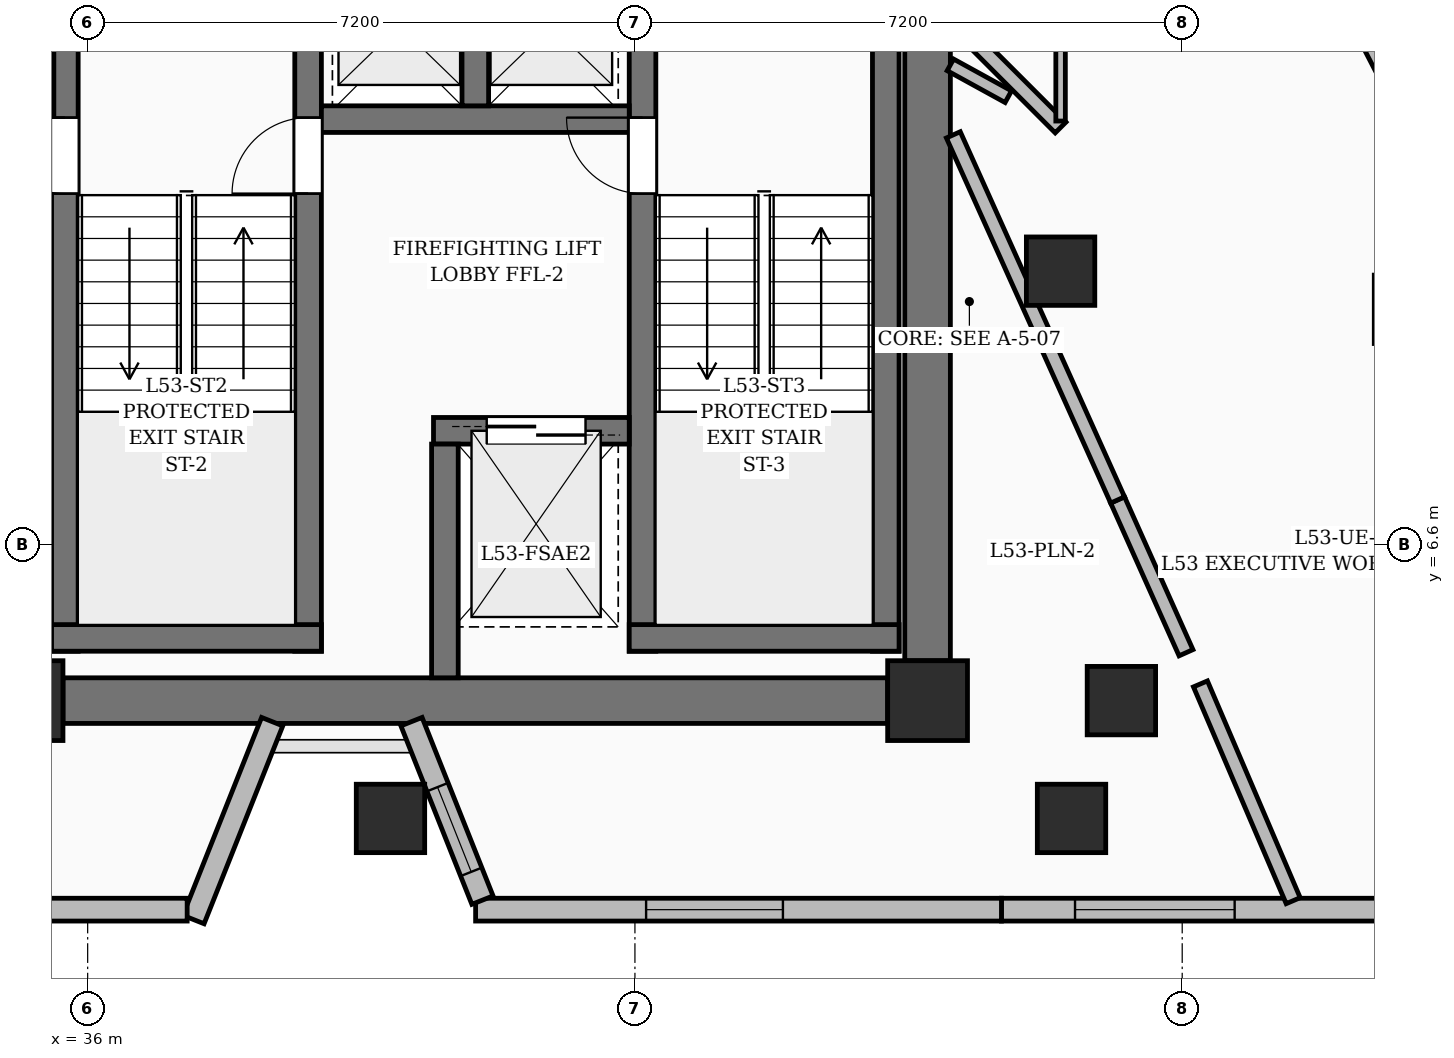
"""IFC4 building model, lengths in metres.
Left out: names, types, materials, properties, quantities, classifications, styles, units other than length and angle.
Written with IfcOpenShell. Run it as: python <this file> out.ifc"""

import sys

from ifc_helpers import new_model, si_unit, direction, frame, frame_2d, origin, origin_2d, place, context, subcontext, project, spatial, rectangle, extrude, element, fill, save


model = new_model("IFC4")
c1 = context("Model", 3, precision=1e-05, world=origin(), true_north=direction((0.0, 1.0)))
c2 = subcontext(c1, "Body", "Model", "MODEL_VIEW")
j1 = project(units=[si_unit("LENGTHUNIT", "METRE"), si_unit("PLANEANGLEUNIT", "RADIAN")], contexts=[c1])
p1 = place(None, origin())
s1 = spatial("IfcSite", under=j1, at=p1, CompositionType="ELEMENT")
p2 = place(p1, origin())
s2 = spatial("IfcBuilding", under=s1, at=p2, CompositionType="ELEMENT")
p3 = place(p2, frame((0.0, 0.0, 207.0)))
s3 = spatial("IfcBuildingStorey", under=s2, at=p3, CompositionType="ELEMENT", Elevation=207.0)
for number, where, z_axis, x_axis in (
    (1, (35.15, 4.55, 0.0), (0.0, 0.0, 1.0), (1.0, 0.0, 0.0)),
    (2, (47.05, 4.55, 0.0), (0.0, 0.0, 1.0), (1.0, 0.0, 0.0)),
):
    element("IfcColumn", number, at=place(p3, frame(where, z_axis=z_axis, x_axis=x_axis)), inside=s3, PredefinedType="COLUMN", context=c2, shape_type="SweptSolid", body=[
        extrude(rectangle(XDim=1.05, YDim=1.05, at=origin_2d()), origin(), (0.0, 0.0, 1.0), 3.75),
    ])
for number, where, z_axis, x_axis in (
    (3, (49.6, 4.55, 0.0), (0.0, 0.0, 1.0), (1.0, 0.0, 0.0)),
    (4, (48.8, 10.2, 0.0), (0.0, 0.0, 1.0), (1.0, 0.0, 0.0)),
):
    element("IfcColumn", number, at=place(p3, frame(where, z_axis=z_axis, x_axis=x_axis)), inside=s3, PredefinedType="COLUMN", context=c2, shape_type="SweptSolid", body=[
        extrude(rectangle(XDim=0.9, YDim=0.9, at=origin_2d()), origin(), (0.0, 0.0, 1.0), 3.75),
    ])
p4 = place(p3, frame((35.675, 4.55, 0.0), z_axis=(0.0, 0.0, 1.0), x_axis=(1.0, 0.0, 0.0)))
e5 = element("IfcWall", 5, at=p4, inside=s3, PredefinedType="SHEAR", context=c2, shape_type="SweptSolid", body=[
    extrude(rectangle(XDim=10.85, YDim=0.6, at=frame_2d((5.425, 0.0))), origin(), (0.0, 0.0, 1.0), 3.75),
])
p5 = place(p3, frame((47.05, 5.075, 0.0), z_axis=(0.0, 0.0, 1.0), x_axis=(0.0, 1.0, 0.0)))
e6 = element("IfcWall", 6, at=p5, inside=s3, PredefinedType="SHEAR", context=c2, shape_type="SweptSolid", body=[
    extrude(rectangle(XDim=9.15, YDim=0.6, at=frame_2d((4.575, 0.0))), origin(), (0.0, 0.0, 1.0), 3.75),
])
p6 = place(p3, frame((35.7, 5.2, 0.0), z_axis=(0.0, 0.0, 1.0), x_axis=(0.0, 1.0, 0.0)))
e7 = element("IfcWall", 7, at=p6, inside=s3, PredefinedType="SOLIDWALL", context=c2, shape_type="SweptSolid", body=[
    extrude(rectangle(XDim=9.25, YDim=0.35, at=frame_2d((4.625, 0.0))), origin(), (0.0, 0.0, 1.0), 3.75),
])
p7 = place(p6, frame((6.02, 0.0, 0.0)))
e8 = element("IfcOpeningElement", 8, at=p7, cuts=e7, PredefinedType="OPENING", context=c2, shape_type="SweptSolid", body=[
    extrude(rectangle(XDim=1.0, YDim=2.15, at=frame_2d((0.5, 1.075))), frame((0.0, 0.185, 0.0), z_axis=(0.0, -1.0, 0.0), x_axis=(1.0, 0.0, 0.0)), (0.0, 0.0, 1.0), 0.37),
])
p8 = place(p3, frame((38.9, 5.2, 0.0), z_axis=(0.0, 0.0, 1.0), x_axis=(0.0, 1.0, 0.0)))
e9 = element("IfcWall", 9, at=p8, inside=s3, PredefinedType="SOLIDWALL", context=c2, shape_type="SweptSolid", body=[
    extrude(rectangle(XDim=9.25, YDim=0.35, at=frame_2d((4.625, 0.0))), origin(), (0.0, 0.0, 1.0), 3.75),
])
p9 = place(p8, frame((6.02, 0.0, 0.0)))
e10 = element("IfcOpeningElement", 10, at=p9, cuts=e9, PredefinedType="OPENING", context=c2, shape_type="SweptSolid", body=[
    extrude(rectangle(XDim=1.0, YDim=2.15, at=frame_2d((0.5, 1.075))), frame((0.0, 0.185, 0.0), z_axis=(0.0, -1.0, 0.0), x_axis=(1.0, 0.0, 0.0)), (0.0, 0.0, 1.0), 0.37),
])
p10 = place(p3, frame((35.525, 5.375, 0.0), z_axis=(0.0, 0.0, 1.0), x_axis=(1.0, 0.0, 0.0)))
e11 = element("IfcWall", 11, at=p10, inside=s3, PredefinedType="SOLIDWALL", context=c2, shape_type="SweptSolid", body=[
    extrude(rectangle(XDim=3.55, YDim=0.35, at=frame_2d((1.775, 0.0))), origin(), (0.0, 0.0, 1.0), 3.75),
])
p11 = place(p3, frame((43.3, 5.2, 0.0), z_axis=(0.0, 0.0, 1.0), x_axis=(0.0, 1.0, 0.0)))
e12 = element("IfcWall", 12, at=p11, inside=s3, PredefinedType="SOLIDWALL", context=c2, shape_type="SweptSolid", body=[
    extrude(rectangle(XDim=9.25, YDim=0.35, at=frame_2d((4.625, 0.0))), origin(), (0.0, 0.0, 1.0), 3.75),
])
p12 = place(p11, frame((6.02, 0.0, 0.0)))
e13 = element("IfcOpeningElement", 13, at=p12, cuts=e12, PredefinedType="OPENING", context=c2, shape_type="SweptSolid", body=[
    extrude(rectangle(XDim=1.0, YDim=2.15, at=frame_2d((0.5, 1.075))), frame((0.0, 0.185, 0.0), z_axis=(0.0, -1.0, 0.0), x_axis=(1.0, 0.0, 0.0)), (0.0, 0.0, 1.0), 0.37),
])
p13 = place(p3, frame((46.5, 5.2, 0.0), z_axis=(0.0, 0.0, 1.0), x_axis=(0.0, 1.0, 0.0)))
e14 = element("IfcWall", 14, at=p13, inside=s3, PredefinedType="SOLIDWALL", context=c2, shape_type="SweptSolid", body=[
    extrude(rectangle(XDim=9.25, YDim=0.35, at=frame_2d((4.625, 0.0))), origin(), (0.0, 0.0, 1.0), 3.75),
])
p14 = place(p3, frame((43.125, 5.375, 0.0), z_axis=(0.0, 0.0, 1.0), x_axis=(1.0, 0.0, 0.0)))
e15 = element("IfcWall", 15, at=p14, inside=s3, PredefinedType="SOLIDWALL", context=c2, shape_type="SweptSolid", body=[
    extrude(rectangle(XDim=3.55, YDim=0.35, at=frame_2d((1.775, 0.0))), origin(), (0.0, 0.0, 1.0), 3.75),
])
p15 = place(p3, frame((40.55, 8.1, 0.0), z_axis=(0.0, 0.0, 1.0), x_axis=(1.0, 0.0, 0.0)))
e16 = element("IfcWall", 16, at=p15, inside=s3, PredefinedType="SOLIDWALL", context=c2, shape_type="SweptSolid", body=[
    extrude(rectangle(XDim=2.575, YDim=0.35, at=frame_2d((1.288, 0.0))), origin(), (0.0, 0.0, 1.0), 3.75),
])
p16 = place(p15, frame((0.7, 0.0, 0.0)))
e17 = element("IfcOpeningElement", 17, at=p16, cuts=e16, PredefinedType="OPENING", context=c2, shape_type="SweptSolid", body=[
    extrude(rectangle(XDim=1.3, YDim=2.25, at=frame_2d((0.65, 1.125))), frame((0.0, 0.185, 0.0), z_axis=(0.0, -1.0, 0.0), x_axis=(1.0, 0.0, 0.0)), (0.0, 0.0, 1.0), 0.37),
])
p17 = place(p3, frame((40.7, 4.85, 0.0), z_axis=(0.0, 0.0, 1.0), x_axis=(0.0, 1.0, 0.0)))
e18 = element("IfcWall", 18, at=p17, inside=s3, PredefinedType="SOLIDWALL", context=c2, shape_type="SweptSolid", body=[
    extrude(rectangle(XDim=3.075, YDim=0.35, at=frame_2d((1.538, 0.0))), origin(), (0.0, 0.0, 1.0), 3.75),
])
p18 = place(p3, frame((39.075, 12.2, 0.0), z_axis=(0.0, 0.0, 1.0), x_axis=(1.0, 0.0, 0.0)))
e19 = element("IfcWall", 19, at=p18, inside=s3, PredefinedType="SOLIDWALL", context=c2, shape_type="SweptSolid", body=[
    extrude(rectangle(XDim=4.05, YDim=0.35, at=frame_2d((2.025, 0.0))), origin(), (0.0, 0.0, 1.0), 3.75),
])
p19 = place(p3, frame((41.1, 12.375, 0.0), z_axis=(0.0, 0.0, 1.0), x_axis=(0.0, 1.0, 0.0)))
e20 = element("IfcWall", 20, at=p19, inside=s3, PredefinedType="SOLIDWALL", context=c2, shape_type="SweptSolid", body=[
    extrude(rectangle(XDim=2.075, YDim=0.35, at=frame_2d((1.038, 0.0))), origin(), (0.0, 0.0, 1.0), 3.75),
])
for number, where, z_axis, x_axis in (
    (21, (39.984, 3.0, 0.0), (0.0, 0.0, 1.0), (1.0, 0.0, 0.0)),
    (22, (48.944, 3.0, 0.0), (0.0, 0.0, 1.0), (1.0, 0.0, 0.0)),
    (23, (53.377, 9.698, 0.0), (0.0, 0.0, 1.0), (1.0, 0.0, 0.0)),
):
    element("IfcColumn", number, at=place(p3, frame(where, z_axis=z_axis, x_axis=x_axis)), inside=s3, PredefinedType="COLUMN", context=c2, shape_type="SweptSolid", body=[
        extrude(rectangle(XDim=0.9, YDim=0.9, at=origin_2d()), origin(), (0.0, 0.0, 1.0), 3.75),
    ])
p20 = place(p3, frame((51.288, 16.369, 0.0), z_axis=(0.0, 0.0, 1.0), x_axis=(0.458306446078, -0.88879424024, 0.0)))
e24 = element("IfcWall", 24, at=p20, inside=s3, PredefinedType="SOLIDWALL", context=c2, shape_type="SweptSolid", body=[
    extrude(rectangle(XDim=6.266, YDim=0.3, at=frame_2d((3.133, 0.0))), origin(), (0.0, 0.0, 1.0), 3.5),
])
p21 = place(p20, frame((2.725, 0.0, 0.55)))
e25 = element("IfcOpeningElement", 25, at=p21, cuts=e24, PredefinedType="OPENING", context=c2, shape_type="SweptSolid", body=[
    extrude(rectangle(XDim=2.1, YDim=2.4, at=frame_2d((1.05, 1.2))), frame((0.0, 0.16, 0.0), z_axis=(0.0, -1.0, 0.0), x_axis=(1.0, 0.0, 0.0)), (0.0, 0.0, 1.0), 0.32),
])
p22 = place(p3, frame((54.36, 1.8, 0.0), z_axis=(0.0, 0.0, 1.0), x_axis=(-1.0, 0.0, 0.0)))
e26 = element("IfcWall", 26, at=p22, inside=s3, PredefinedType="SOLIDWALL", context=c2, shape_type="SweptSolid", body=[
    extrude(rectangle(XDim=6.338, YDim=0.3, at=frame_2d((3.169, 0.0))), origin(), (0.0, 0.0, 1.0), 3.5),
])
p23 = place(p22, frame((3.27, 0.0, 0.55)))
e27 = element("IfcOpeningElement", 27, at=p23, cuts=e26, PredefinedType="OPENING", context=c2, shape_type="SweptSolid", body=[
    extrude(rectangle(XDim=2.1, YDim=2.4, at=frame_2d((1.05, 1.2))), frame((0.0, 0.16, 0.0), z_axis=(0.0, -1.0, 0.0), x_axis=(1.0, 0.0, 0.0)), (0.0, 0.0, 1.0), 0.32),
])
p24 = place(p3, frame((48.022, 1.8, 0.0), z_axis=(0.0, 0.0, 1.0), x_axis=(-1.0, 0.0, 0.0)))
e28 = element("IfcWall", 28, at=p24, inside=s3, PredefinedType="SOLIDWALL", context=c2, shape_type="SweptSolid", body=[
    extrude(rectangle(XDim=6.918, YDim=0.3, at=frame_2d((3.459, 0.0))), origin(), (0.0, 0.0, 1.0), 3.5),
])
p25 = place(p24, frame((2.875, 0.0, 0.6)))
e29 = element("IfcOpeningElement", 29, at=p25, cuts=e28, PredefinedType="OPENING", context=c2, shape_type="SweptSolid", body=[
    extrude(rectangle(XDim=1.8, YDim=2.1, at=frame_2d((0.9, 1.05))), frame((0.0, 0.16, 0.0), z_axis=(0.0, -1.0, 0.0), x_axis=(1.0, 0.0, 0.0)), (0.0, 0.0, 1.0), 0.32),
])
p26 = place(p3, frame((41.194, 1.925, 0.0), z_axis=(0.0, 0.0, 1.0), x_axis=(-0.369457562636, 0.929247603931, 0.0)))
e30 = element("IfcWall", 30, at=p26, inside=s3, PredefinedType="SOLIDWALL", context=c2, shape_type="SweptSolid", body=[
    extrude(rectangle(XDim=2.527, YDim=0.3, at=frame_2d((1.263, 0.0))), origin(), (0.0, 0.0, 1.0), 2.825),
])
p27 = place(p26, frame((0.4, 0.0, 0.8)))
e31 = element("IfcOpeningElement", 31, at=p27, cuts=e30, PredefinedType="OPENING", context=c2, shape_type="SweptSolid", body=[
    extrude(rectangle(XDim=1.2, YDim=1.8, at=frame_2d((0.6, 0.9))), frame((0.0, 0.16, 0.0), z_axis=(0.0, -1.0, 0.0), x_axis=(1.0, 0.0, 0.0)), (0.0, 0.0, 1.0), 0.32),
])
p28 = place(p3, frame((38.427, 4.273, 0.0), z_axis=(0.0, 0.0, 1.0), x_axis=(-0.369466825356, -0.929243921132, 0.0)))
e32 = element("IfcWall", 32, at=p28, inside=s3, PredefinedType="SOLIDWALL", context=c2, shape_type="SweptSolid", body=[
    extrude(rectangle(XDim=2.802, YDim=0.3, at=frame_2d((1.401, 0.0))), origin(), (0.0, 0.0, 1.0), 2.69),
])
p29 = place(p3, frame((37.309, 1.8, 0.0), z_axis=(0.0, 0.0, 1.0), x_axis=(-1.0, 0.0, 0.0)))
e33 = element("IfcWall", 33, at=p29, inside=s3, PredefinedType="SOLIDWALL", context=c2, shape_type="SweptSolid", body=[
    extrude(rectangle(XDim=6.3, YDim=0.3, at=frame_2d((3.15, 0.0))), origin(), (0.0, 0.0, 1.0), 3.5),
])
p30 = place(p29, frame((4.4, 0.0, 0.8)))
e34 = element("IfcOpeningElement", 34, at=p30, cuts=e33, PredefinedType="OPENING", context=c2, shape_type="SweptSolid", body=[
    extrude(rectangle(XDim=1.2, YDim=1.8, at=frame_2d((0.6, 0.9))), frame((0.0, 0.16, 0.0), z_axis=(0.0, -1.0, 0.0), x_axis=(1.0, 0.0, 0.0)), (0.0, 0.0, 1.0), 0.32),
])
p31 = place(p3, frame((35.48, 12.22, 0.0), z_axis=(0.0, 0.0, 1.0), x_axis=(0.0, 1.0, 0.0)))
e35 = element("IfcWall", 35, at=p31, inside=s3, PredefinedType="PARTITIONING", context=c2, shape_type="SweptSolid", body=[
    extrude(rectangle(XDim=2.396, YDim=0.15, at=frame_2d((1.198, 0.0))), origin(), (0.0, 0.0, 1.0), 3.5),
])
p32 = place(p3, frame((50.45, 5.18, 0.0), z_axis=(0.0, 0.0, 1.0), x_axis=(-0.408626143047, 0.912701854506, 0.0)))
e36 = element("IfcWall", 36, at=p32, inside=s3, PredefinedType="PARTITIONING", context=c2, shape_type="SweptSolid", body=[
    extrude(rectangle(XDim=2.202, YDim=0.2, at=frame_2d((1.101, 0.0))), origin(), (0.0, 0.0, 1.0), 2.82),
])
p33 = place(p3, frame((51.86, 1.918, 0.0), z_axis=(0.0, 0.0, 1.0), x_axis=(-0.393349316575, 0.919389098886, 0.0)))
e37 = element("IfcWall", 37, at=p33, inside=s3, PredefinedType="PARTITIONING", context=c2, shape_type="SweptSolid", body=[
    extrude(rectangle(XDim=3.102, YDim=0.2, at=frame_2d((1.551, 0.0))), origin(), (0.0, 0.0, 1.0), 3.5),
])
p34 = place(p3, frame((49.55, 7.19, 0.0), z_axis=(0.0, 0.0, 1.0), x_axis=(-0.410297221829, 0.91195185715, 0.0)))
e38 = element("IfcWall", 38, at=p34, inside=s3, PredefinedType="PARTITIONING", context=c2, shape_type="SweptSolid", body=[
    extrude(rectangle(XDim=5.267, YDim=0.2, at=frame_2d((2.634, 0.0))), origin(), (0.0, 0.0, 1.0), 2.685),
])
p35 = place(p3, frame((48.8, 12.09, 0.0), z_axis=(0.0, 0.0, 1.0), x_axis=(-0.707106781187, 0.707106781187, 0.0)))
e39 = element("IfcWall", 39, at=p35, inside=s3, PredefinedType="PARTITIONING", context=c2, shape_type="SweptSolid", body=[
    extrude(rectangle(XDim=2.051, YDim=0.2, at=frame_2d((1.025, 0.0))), origin(), (0.0, 0.0, 1.0), 3.5),
])
p36 = place(p3, frame((48.8, 12.175, 0.0), z_axis=(0.0, 0.0, 1.0), x_axis=(0.0, 1.0, 0.0)))
e40 = element("IfcWall", 40, at=p36, inside=s3, PredefinedType="PARTITIONING", context=c2, shape_type="SweptSolid", body=[
    extrude(rectangle(XDim=2.415, YDim=0.125, at=frame_2d((1.208, 0.0))), origin(), (0.0, 0.0, 1.0), 3.061),
])
p37 = place(p36, frame((0.979, 0.0, 0.0)))
e41 = element("IfcOpeningElement", 41, at=p37, cuts=e40, PredefinedType="OPENING", context=c2, shape_type="SweptSolid", body=[
    extrude(rectangle(XDim=0.95, YDim=2.2, at=frame_2d((0.475, 1.1))), frame((0.0, 0.072, 0.0), z_axis=(0.0, -1.0, 0.0), x_axis=(1.0, 0.0, 0.0)), (0.0, 0.0, 1.0), 0.145),
])
p38 = place(p3, frame((47.35, 12.914, 0.0), z_axis=(0.0, 0.0, 1.0), x_axis=(0.876281108122, -0.481800186331, 0.0)))
e42 = element("IfcWall", 42, at=p38, inside=s3, PredefinedType="PARTITIONING", context=c2, shape_type="SweptSolid", body=[
    extrude(rectangle(XDim=0.87, YDim=0.175, at=frame_2d((0.435, 0.0))), origin(), (0.0, 0.0, 1.0), 3.5),
])
p39 = place(p21, origin())
e43 = element("IfcWindow", 43, at=p39, inside=s3, PartitioningType="SINGLE_PANEL", PredefinedType="WINDOW", context=c2, shape_type="SweptSolid", body=[
    extrude(rectangle(XDim=2.1, YDim=2.4, at=frame_2d((1.05, 1.2))), frame((0.0, 0.03, 0.0), z_axis=(0.0, -1.0, 0.0), x_axis=(1.0, 0.0, 0.0)), (0.0, 0.0, 1.0), 0.06),
])
fill(e25, e43)
p40 = place(p23, origin())
e44 = element("IfcWindow", 44, at=p40, inside=s3, PartitioningType="SINGLE_PANEL", PredefinedType="WINDOW", context=c2, shape_type="SweptSolid", body=[
    extrude(rectangle(XDim=2.1, YDim=2.4, at=frame_2d((1.05, 1.2))), frame((0.0, 0.03, 0.0), z_axis=(0.0, -1.0, 0.0), x_axis=(1.0, 0.0, 0.0)), (0.0, 0.0, 1.0), 0.06),
])
fill(e27, e44)
p41 = place(p25, origin())
e45 = element("IfcWindow", 45, at=p41, inside=s3, PartitioningType="SINGLE_PANEL", PredefinedType="WINDOW", context=c2, shape_type="SweptSolid", body=[
    extrude(rectangle(XDim=1.8, YDim=2.1, at=frame_2d((0.9, 1.05))), frame((0.0, 0.03, 0.0), z_axis=(0.0, -1.0, 0.0), x_axis=(1.0, 0.0, 0.0)), (0.0, 0.0, 1.0), 0.06),
])
fill(e29, e45)
p42 = place(p27, origin())
e46 = element("IfcWindow", 46, at=p42, inside=s3, PartitioningType="SINGLE_PANEL", PredefinedType="WINDOW", context=c2, shape_type="SweptSolid", body=[
    extrude(rectangle(XDim=1.2, YDim=1.8, at=frame_2d((0.6, 0.9))), frame((0.0, 0.03, 0.0), z_axis=(0.0, -1.0, 0.0), x_axis=(1.0, 0.0, 0.0)), (0.0, 0.0, 1.0), 0.06),
])
fill(e31, e46)
p43 = place(p7, origin())
e47 = element("IfcDoor", 47, at=p43, inside=s3, OperationType="SINGLE_SWING_RIGHT", PredefinedType="DOOR", context=c2, shape_type="SweptSolid", body=[
    extrude(rectangle(XDim=1.0, YDim=2.15, at=frame_2d((0.5, 1.075))), frame((0.0, 0.025, 0.0), z_axis=(0.0, -1.0, 0.0), x_axis=(1.0, 0.0, 0.0)), (0.0, 0.0, 1.0), 0.05),
])
fill(e8, e47)
p44 = place(p9, origin())
e48 = element("IfcDoor", 48, at=p44, inside=s3, OperationType="SINGLE_SWING_LEFT", PredefinedType="DOOR", context=c2, shape_type="SweptSolid", body=[
    extrude(rectangle(XDim=1.0, YDim=2.15, at=frame_2d((0.5, 1.075))), frame((0.0, 0.025, 0.0), z_axis=(0.0, -1.0, 0.0), x_axis=(1.0, 0.0, 0.0)), (0.0, 0.0, 1.0), 0.05),
])
fill(e10, e48)
p45 = place(p12, origin())
e49 = element("IfcDoor", 49, at=p45, inside=s3, OperationType="SINGLE_SWING_RIGHT", PredefinedType="DOOR", context=c2, shape_type="SweptSolid", body=[
    extrude(rectangle(XDim=1.0, YDim=2.15, at=frame_2d((0.5, 1.075))), frame((0.0, 0.025, 0.0), z_axis=(0.0, -1.0, 0.0), x_axis=(1.0, 0.0, 0.0)), (0.0, 0.0, 1.0), 0.05),
])
fill(e13, e49)
p46 = place(p16, origin())
e50 = element("IfcDoor", 50, at=p46, inside=s3, OperationType="DOUBLE_DOOR_SLIDING", PredefinedType="DOOR", context=c2, shape_type="SweptSolid", body=[
    extrude(rectangle(XDim=1.3, YDim=2.25, at=frame_2d((0.65, 1.125))), frame((0.0, 0.025, 0.0), z_axis=(0.0, -1.0, 0.0), x_axis=(1.0, 0.0, 0.0)), (0.0, 0.0, 1.0), 0.05),
])
fill(e17, e50)
save(model, sys.argv[1])
